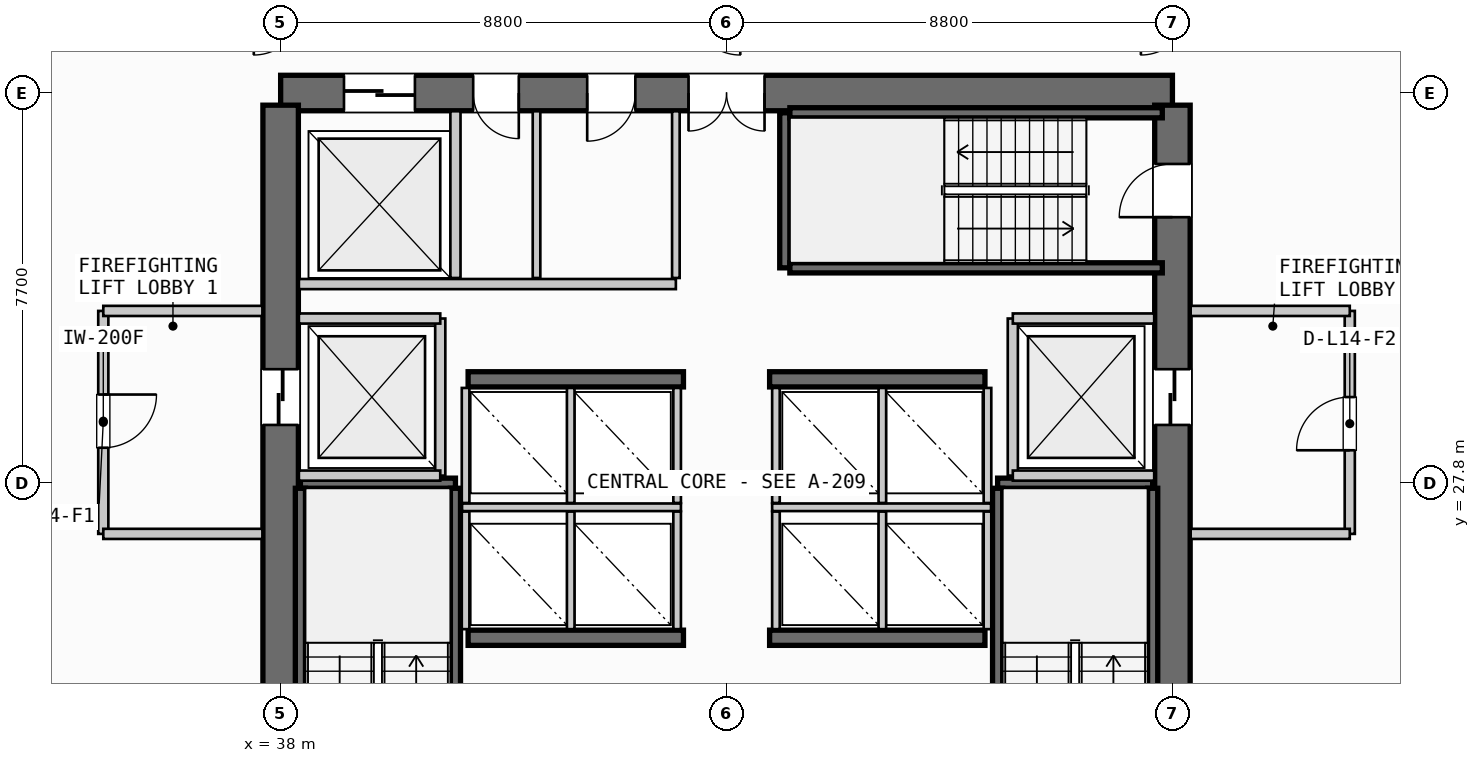
"""IFC4 building model, lengths in metres.
Left out: names, types, materials, properties, quantities, classifications, styles, units other than length and angle.
Written with IfcOpenShell. Run it as: python <this file> out.ifc"""

import sys

from ifc_helpers import new_model, si_unit, direction, frame, frame_2d, origin, place, context, subcontext, project, spatial, rectangle, extrude, source, transform, mapped, element, fill, save


model = new_model("IFC4")
c1 = context("Model", 3, precision=1e-05, world=origin(), true_north=direction((0.0, 1.0)))
c2 = subcontext(c1, "Body", "Model", "MODEL_VIEW")
j1 = project(units=[si_unit("LENGTHUNIT", "METRE"), si_unit("PLANEANGLEUNIT", "RADIAN")], contexts=[c1])
p1 = place(None, origin())
s1 = spatial("IfcSite", under=j1, at=p1, CompositionType="ELEMENT")
p2 = place(p1, origin())
s2 = spatial("IfcBuilding", under=s1, at=p2, CompositionType="ELEMENT")
p3 = place(p2, frame((0.0, 0.0, 60.0)))
s3 = spatial("IfcBuildingStorey", under=s2, at=p3, CompositionType="ELEMENT", Elevation=60.0)
p4 = place(p3, frame((55.6, 35.5, 0.0), z_axis=(0.0, 0.0, 1.0), x_axis=(-1.0, 0.0, 0.0)))
e1 = element("IfcWall", 1, at=p4, inside=s3, PredefinedType="SHEAR", context=c2, shape_type="SweptSolid", body=[
    extrude(rectangle(XDim=17.6, YDim=0.7, at=frame_2d((8.8, 0.0))), origin(), (0.0, 0.0, 1.0), 3.55),
])
p5 = place(p4, frame((8.05, 0.0, 0.0)))
e2 = element("IfcOpeningElement", 2, at=p5, cuts=e1, PredefinedType="OPENING", context=c2, shape_type="SweptSolid", body=[
    extrude(rectangle(XDim=1.5, YDim=2.2, at=frame_2d((0.75, 1.1))), frame((0.0, 0.36, 0.0), z_axis=(0.0, -1.0, 0.0), x_axis=(1.0, 0.0, 0.0)), (0.0, 0.0, 1.0), 0.72),
])
p6 = place(p4, frame((14.95, 0.0, 0.0)))
e3 = element("IfcOpeningElement", 3, at=p6, cuts=e1, PredefinedType="OPENING", context=c2, shape_type="SweptSolid", body=[
    extrude(rectangle(XDim=1.4, YDim=2.3, at=frame_2d((0.7, 1.15))), frame((0.0, 0.36, 0.0), z_axis=(0.0, -1.0, 0.0), x_axis=(1.0, 0.0, 0.0)), (0.0, 0.0, 1.0), 0.72),
])
p7 = place(p4, frame((12.9, 0.0, 0.0)))
e4 = element("IfcOpeningElement", 4, at=p7, cuts=e1, PredefinedType="OPENING", context=c2, shape_type="SweptSolid", body=[
    extrude(rectangle(XDim=0.9, YDim=2.15, at=frame_2d((0.45, 1.075))), frame((0.0, 0.36, 0.0), z_axis=(0.0, -1.0, 0.0), x_axis=(1.0, 0.0, 0.0)), (0.0, 0.0, 1.0), 0.72),
])
p8 = place(p4, frame((10.6, 0.0, 0.0)))
e5 = element("IfcOpeningElement", 5, at=p8, cuts=e1, PredefinedType="OPENING", context=c2, shape_type="SweptSolid", body=[
    extrude(rectangle(XDim=0.95, YDim=2.15, at=frame_2d((0.475, 1.075))), frame((0.0, 0.36, 0.0), z_axis=(0.0, -1.0, 0.0), x_axis=(1.0, 0.0, 0.0)), (0.0, 0.0, 1.0), 0.72),
])
p9 = place(p3, frame((38.0, 35.26, 0.0), z_axis=(0.0, 0.0, 1.0), x_axis=(0.0, -1.0, 0.0)))
e6 = element("IfcWall", 6, at=p9, inside=s3, PredefinedType="SHEAR", context=c2, shape_type="SweptSolid", body=[
    extrude(rectangle(XDim=14.92, YDim=0.7, at=frame_2d((7.46, 0.0))), origin(), (0.0, 0.0, 1.0), 3.55),
])
p10 = place(p9, frame((5.21, 0.0, 0.0)))
e7 = element("IfcOpeningElement", 7, at=p10, cuts=e6, PredefinedType="OPENING", context=c2, shape_type="SweptSolid", body=[
    extrude(rectangle(XDim=1.1, YDim=2.2, at=frame_2d((0.55, 1.1))), frame((0.0, 0.36, 0.0), z_axis=(0.0, -1.0, 0.0), x_axis=(1.0, 0.0, 0.0)), (0.0, 0.0, 1.0), 0.72),
])
p11 = place(p3, frame((55.6, 20.34, 0.0), z_axis=(0.0, 0.0, 1.0), x_axis=(0.0, 1.0, 0.0)))
e8 = element("IfcWall", 8, at=p11, inside=s3, PredefinedType="SHEAR", context=c2, shape_type="SweptSolid", body=[
    extrude(rectangle(XDim=14.92, YDim=0.7, at=frame_2d((7.46, 0.0))), origin(), (0.0, 0.0, 1.0), 3.55),
])
p12 = place(p11, frame((12.71, 0.0, 0.0)))
e9 = element("IfcOpeningElement", 9, at=p12, cuts=e8, PredefinedType="OPENING", context=c2, shape_type="SweptSolid", body=[
    extrude(rectangle(XDim=1.05, YDim=2.15, at=frame_2d((0.525, 1.075))), frame((0.0, 0.36, 0.0), z_axis=(0.0, -1.0, 0.0), x_axis=(1.0, 0.0, 0.0)), (0.0, 0.0, 1.0), 0.72),
])
p13 = place(p11, frame((8.61, 0.0, 0.0)))
e10 = element("IfcOpeningElement", 10, at=p13, cuts=e8, PredefinedType="OPENING", context=c2, shape_type="SweptSolid", body=[
    extrude(rectangle(XDim=1.1, YDim=2.2, at=frame_2d((0.55, 1.1))), frame((0.0, 0.36, 0.0), z_axis=(0.0, -1.0, 0.0), x_axis=(1.0, 0.0, 0.0)), (0.0, 0.0, 1.0), 0.72),
])
for number, where, z_axis, x_axis in (
    (11, (41.7, 24.75, 0.0), (0.0, 0.0, 1.0), (1.0, 0.0, 0.0)),
    (12, (47.65, 24.75, 0.0), (0.0, 0.0, 1.0), (1.0, 0.0, 0.0)),
    (13, (41.7, 29.85, 0.0), (0.0, 0.0, 1.0), (1.0, 0.0, 0.0)),
    (14, (47.65, 29.85, 0.0), (0.0, 0.0, 1.0), (1.0, 0.0, 0.0)),
):
    element("IfcWall", number, at=place(p3, frame(where, z_axis=z_axis, x_axis=x_axis)), inside=s3, PredefinedType="SHEAR", context=c2, shape_type="SweptSolid", body=[
        extrude(rectangle(XDim=4.25, YDim=0.3, at=frame_2d((2.125, 0.0))), origin(), (0.0, 0.0, 1.0), 3.55),
    ])
p14 = place(p3, frame((38.39, 27.8, 0.0), z_axis=(0.0, 0.0, 1.0), x_axis=(1.0, 0.0, 0.0)))
e15 = element("IfcWall", 15, at=p14, inside=s3, PredefinedType="SHEAR", context=c2, shape_type="SweptSolid", body=[
    extrude(rectangle(XDim=3.06, YDim=0.2, at=frame_2d((1.53, 0.0))), origin(), (0.0, 0.0, 1.0), 3.55),
])
for number, where, z_axis, x_axis in (
    (16, (41.45, 27.7, 0.0), (0.0, 0.0, 1.0), (0.0, -1.0, 0.0)),
    (17, (38.39, 20.35, 0.0), (0.0, 0.0, 1.0), (0.0, 1.0, 0.0)),
):
    element("IfcWall", number, at=place(p3, frame(where, z_axis=z_axis, x_axis=x_axis)), inside=s3, PredefinedType="SHEAR", context=c2, shape_type="SweptSolid", body=[
        extrude(rectangle(XDim=7.35, YDim=0.2, at=frame_2d((3.675, 0.0))), origin(), (0.0, 0.0, 1.0), 3.55),
    ])
p15 = place(p3, frame((52.15, 27.8, 0.0), z_axis=(0.0, 0.0, 1.0), x_axis=(1.0, 0.0, 0.0)))
e18 = element("IfcWall", 18, at=p15, inside=s3, PredefinedType="SHEAR", context=c2, shape_type="SweptSolid", body=[
    extrude(rectangle(XDim=3.06, YDim=0.2, at=frame_2d((1.53, 0.0))), origin(), (0.0, 0.0, 1.0), 3.55),
])
for number, where, z_axis, x_axis in (
    (19, (55.21, 27.7, 0.0), (0.0, 0.0, 1.0), (0.0, -1.0, 0.0)),
    (20, (52.15, 20.35, 0.0), (0.0, 0.0, 1.0), (0.0, 1.0, 0.0)),
):
    element("IfcWall", number, at=place(p3, frame(where, z_axis=z_axis, x_axis=x_axis)), inside=s3, PredefinedType="SHEAR", context=c2, shape_type="SweptSolid", body=[
        extrude(rectangle(XDim=7.35, YDim=0.2, at=frame_2d((3.675, 0.0))), origin(), (0.0, 0.0, 1.0), 3.55),
    ])
p16 = place(p3, frame((47.95, 32.05, 0.0), z_axis=(0.0, 0.0, 1.0), x_axis=(0.0, 1.0, 0.0)))
e21 = element("IfcWall", 21, at=p16, inside=s3, PredefinedType="SHEAR", context=c2, shape_type="SweptSolid", body=[
    extrude(rectangle(XDim=3.06, YDim=0.2, at=frame_2d((1.53, 0.0))), origin(), (0.0, 0.0, 1.0), 3.55),
])
for number, where, z_axis, x_axis in (
    (22, (48.05, 35.11, 0.0), (0.0, 0.0, 1.0), (1.0, 0.0, 0.0)),
    (23, (55.4, 32.05, 0.0), (0.0, 0.0, 1.0), (-1.0, 0.0, 0.0)),
):
    element("IfcWall", number, at=place(p3, frame(where, z_axis=z_axis, x_axis=x_axis)), inside=s3, PredefinedType="SHEAR", context=c2, shape_type="SweptSolid", body=[
        extrude(rectangle(XDim=7.35, YDim=0.2, at=frame_2d((3.675, 0.0))), origin(), (0.0, 0.0, 1.0), 3.55),
    ])
p17 = place(p3, frame((41.15, 27.95, 0.0), z_axis=(0.0, 0.0, 1.0), x_axis=(0.0, 1.0, 0.0)))
e24 = element("IfcWall", 24, at=p17, inside=s3, PredefinedType="PARTITIONING", context=c2, shape_type="SweptSolid", body=[
    extrude(rectangle(XDim=3.1, YDim=0.2, at=frame_2d((1.55, 0.0))), origin(), (0.0, 0.0, 1.0), 2.645),
])
for number, where, z_axis, x_axis in (
    (25, (38.36, 27.95, 0.0), (0.0, 0.0, 1.0), (1.0, 0.0, 0.0)),
    (26, (38.36, 31.05, 0.0), (0.0, 0.0, 1.0), (1.0, 0.0, 0.0)),
):
    element("IfcWall", number, at=place(p3, frame(where, z_axis=z_axis, x_axis=x_axis)), inside=s3, PredefinedType="PARTITIONING", context=c2, shape_type="SweptSolid", body=[
        extrude(rectangle(XDim=2.79, YDim=0.2, at=frame_2d((1.395, 0.0))), origin(), (0.0, 0.0, 1.0), 2.645),
    ])
p18 = place(p3, frame((34.5, 31.2, 0.0), z_axis=(0.0, 0.0, 1.0), x_axis=(0.0, -1.0, 0.0)))
e27 = element("IfcWall", 27, at=p18, inside=s3, PredefinedType="PARTITIONING", context=c2, shape_type="SweptSolid", body=[
    extrude(rectangle(XDim=4.4, YDim=0.2, at=frame_2d((2.2, 0.0))), origin(), (0.0, 0.0, 1.0), 2.645),
])
p19 = place(p18, frame((1.65, 0.0, 0.0)))
e28 = element("IfcOpeningElement", 28, at=p19, cuts=e27, PredefinedType="OPENING", context=c2, shape_type="SweptSolid", body=[
    extrude(rectangle(XDim=1.05, YDim=2.15, at=frame_2d((0.525, 1.075))), frame((0.0, 0.11, 0.0), z_axis=(0.0, -1.0, 0.0), x_axis=(1.0, 0.0, 0.0)), (0.0, 0.0, 1.0), 0.22),
])
for number, where, z_axis, x_axis in (
    (29, (34.5, 26.8, 0.0), (0.0, 0.0, 1.0), (1.0, 0.0, 0.0)),
    (30, (34.5, 31.2, 0.0), (0.0, 0.0, 1.0), (1.0, 0.0, 0.0)),
):
    element("IfcWall", number, at=place(p3, frame(where, z_axis=z_axis, x_axis=x_axis)), inside=s3, PredefinedType="PARTITIONING", context=c2, shape_type="SweptSolid", body=[
        extrude(rectangle(XDim=3.14, YDim=0.2, at=frame_2d((1.57, 0.0))), origin(), (0.0, 0.0, 1.0), 2.645),
    ])
p20 = place(p3, frame((52.45, 27.95, 0.0), z_axis=(0.0, 0.0, 1.0), x_axis=(0.0, 1.0, 0.0)))
e31 = element("IfcWall", 31, at=p20, inside=s3, PredefinedType="PARTITIONING", context=c2, shape_type="SweptSolid", body=[
    extrude(rectangle(XDim=3.1, YDim=0.2, at=frame_2d((1.55, 0.0))), origin(), (0.0, 0.0, 1.0), 2.645),
])
for number, where, z_axis, x_axis in (
    (32, (52.45, 27.95, 0.0), (0.0, 0.0, 1.0), (1.0, 0.0, 0.0)),
    (33, (52.45, 31.05, 0.0), (0.0, 0.0, 1.0), (1.0, 0.0, 0.0)),
):
    element("IfcWall", number, at=place(p3, frame(where, z_axis=z_axis, x_axis=x_axis)), inside=s3, PredefinedType="PARTITIONING", context=c2, shape_type="SweptSolid", body=[
        extrude(rectangle(XDim=2.79, YDim=0.2, at=frame_2d((1.395, 0.0))), origin(), (0.0, 0.0, 1.0), 2.645),
    ])
p21 = place(p3, frame((59.1, 26.8, 0.0), z_axis=(0.0, 0.0, 1.0), x_axis=(0.0, 1.0, 0.0)))
e34 = element("IfcWall", 34, at=p21, inside=s3, PredefinedType="PARTITIONING", context=c2, shape_type="SweptSolid", body=[
    extrude(rectangle(XDim=4.4, YDim=0.2, at=frame_2d((2.2, 0.0))), origin(), (0.0, 0.0, 1.0), 2.645),
])
p22 = place(p21, frame((1.65, 0.0, 0.0)))
e35 = element("IfcOpeningElement", 35, at=p22, cuts=e34, PredefinedType="OPENING", context=c2, shape_type="SweptSolid", body=[
    extrude(rectangle(XDim=1.05, YDim=2.15, at=frame_2d((0.525, 1.075))), frame((0.0, 0.11, 0.0), z_axis=(0.0, -1.0, 0.0), x_axis=(1.0, 0.0, 0.0)), (0.0, 0.0, 1.0), 0.22),
])
for number, where, z_axis, x_axis in (
    (36, (55.96, 26.8, 0.0), (0.0, 0.0, 1.0), (1.0, 0.0, 0.0)),
    (37, (55.96, 31.2, 0.0), (0.0, 0.0, 1.0), (1.0, 0.0, 0.0)),
):
    element("IfcWall", number, at=place(p3, frame(where, z_axis=z_axis, x_axis=x_axis)), inside=s3, PredefinedType="PARTITIONING", context=c2, shape_type="SweptSolid", body=[
        extrude(rectangle(XDim=3.14, YDim=0.2, at=frame_2d((1.57, 0.0))), origin(), (0.0, 0.0, 1.0), 2.645),
    ])
p23 = place(p3, frame((41.58, 27.325, 0.0), z_axis=(0.0, 0.0, 1.0), x_axis=(1.0, 0.0, 0.0)))
e38 = element("IfcWall", 38, at=p23, inside=s3, PredefinedType="PARTITIONING", context=c2, shape_type="SweptSolid", body=[
    extrude(rectangle(XDim=4.32, YDim=0.15, at=frame_2d((2.16, 0.0))), origin(), (0.0, 0.0, 1.0), 2.645),
])
p24 = place(p3, frame((47.7, 27.325, 0.0), z_axis=(0.0, 0.0, 1.0), x_axis=(1.0, 0.0, 0.0)))
e39 = element("IfcWall", 39, at=p24, inside=s3, PredefinedType="PARTITIONING", context=c2, shape_type="SweptSolid", body=[
    extrude(rectangle(XDim=4.32, YDim=0.15, at=frame_2d((2.16, 0.0))), origin(), (0.0, 0.0, 1.0), 2.645),
])
for number, where, z_axis, x_axis in (
    (40, (41.65, 24.92, 0.0), (0.0, 0.0, 1.0), (0.0, 1.0, 0.0)),
    (41, (43.725, 24.92, 0.0), (0.0, 0.0, 1.0), (0.0, 1.0, 0.0)),
    (42, (45.825, 24.92, 0.0), (0.0, 0.0, 1.0), (0.0, 1.0, 0.0)),
    (43, (47.775, 24.92, 0.0), (0.0, 0.0, 1.0), (0.0, 1.0, 0.0)),
    (44, (49.875, 24.92, 0.0), (0.0, 0.0, 1.0), (0.0, 1.0, 0.0)),
    (45, (51.95, 24.92, 0.0), (0.0, 0.0, 1.0), (0.0, 1.0, 0.0)),
):
    element("IfcWall", number, at=place(p3, frame(where, z_axis=z_axis, x_axis=x_axis)), inside=s3, PredefinedType="PARTITIONING", context=c2, shape_type="SweptSolid", body=[
        extrude(rectangle(XDim=2.32, YDim=0.15, at=frame_2d((1.16, 0.0))), origin(), (0.0, 0.0, 1.0), 2.645),
    ])
for number, where, z_axis, x_axis in (
    (46, (41.65, 27.41, 0.0), (0.0, 0.0, 1.0), (0.0, 1.0, 0.0)),
    (47, (43.725, 27.41, 0.0), (0.0, 0.0, 1.0), (0.0, 1.0, 0.0)),
    (48, (45.825, 27.41, 0.0), (0.0, 0.0, 1.0), (0.0, 1.0, 0.0)),
    (49, (47.775, 27.41, 0.0), (0.0, 0.0, 1.0), (0.0, 1.0, 0.0)),
    (50, (49.875, 27.41, 0.0), (0.0, 0.0, 1.0), (0.0, 1.0, 0.0)),
    (51, (51.95, 27.41, 0.0), (0.0, 0.0, 1.0), (0.0, 1.0, 0.0)),
):
    element("IfcWall", number, at=place(p3, frame(where, z_axis=z_axis, x_axis=x_axis)), inside=s3, PredefinedType="PARTITIONING", context=c2, shape_type="SweptSolid", body=[
        extrude(rectangle(XDim=2.27, YDim=0.15, at=frame_2d((1.135, 0.0))), origin(), (0.0, 0.0, 1.0), 2.645),
    ])
p25 = place(p3, frame((41.45, 31.85, 0.0), z_axis=(0.0, 0.0, 1.0), x_axis=(0.0, 1.0, 0.0)))
e52 = element("IfcWall", 52, at=p25, inside=s3, PredefinedType="PARTITIONING", context=c2, shape_type="SweptSolid", body=[
    extrude(rectangle(XDim=3.29, YDim=0.2, at=frame_2d((1.645, 0.0))), origin(), (0.0, 0.0, 1.0), 2.645),
])
p26 = place(p3, frame((38.36, 31.73, 0.0), z_axis=(0.0, 0.0, 1.0), x_axis=(1.0, 0.0, 0.0)))
e53 = element("IfcWall", 53, at=p26, inside=s3, PredefinedType="PARTITIONING", context=c2, shape_type="SweptSolid", body=[
    extrude(rectangle(XDim=7.44, YDim=0.2, at=frame_2d((3.72, 0.0))), origin(), (0.0, 0.0, 1.0), 2.645),
])
p27 = place(p3, frame((45.8, 31.85, 0.0), z_axis=(0.0, 0.0, 1.0), x_axis=(0.0, 1.0, 0.0)))
e54 = element("IfcWall", 54, at=p27, inside=s3, PredefinedType="PARTITIONING", context=c2, shape_type="SweptSolid", body=[
    extrude(rectangle(XDim=3.29, YDim=0.15, at=frame_2d((1.645, 0.0))), origin(), (0.0, 0.0, 1.0), 2.645),
])
p28 = place(p3, frame((43.05, 31.85, 0.0), z_axis=(0.0, 0.0, 1.0), x_axis=(0.0, 1.0, 0.0)))
e55 = element("IfcWall", 55, at=p28, inside=s3, PredefinedType="PLUMBINGWALL", context=c2, shape_type="SweptSolid", body=[
    extrude(rectangle(XDim=3.29, YDim=0.15, at=frame_2d((1.645, 0.0))), origin(), (0.0, 0.0, 1.0), 2.645),
])
m1 = source(origin(), c2, "Body", "SweptSolid", [
    extrude(rectangle(XDim=1.05, YDim=2.15, at=frame_2d((0.525, 1.075))), frame((0.0, 0.025, 0.0), z_axis=(0.0, -1.0, 0.0), x_axis=(1.0, 0.0, 0.0)), (0.0, 0.0, 1.0), 0.05),
])
p29 = place(p12, origin())
e56 = element("IfcDoor", 56, at=p29, inside=s3, OperationType="SINGLE_SWING_LEFT", PredefinedType="DOOR", context=c2, shape_type="MappedRepresentation", body=[
    mapped(m1, transform((0.0, 0.0, 0.0), scale=1.0)),
])
fill(e9, e56)
m2 = source(origin(), c2, "Body", "SweptSolid", [
    extrude(rectangle(XDim=1.5, YDim=2.2, at=frame_2d((0.75, 1.1))), frame((0.0, 0.025, 0.0), z_axis=(0.0, -1.0, 0.0), x_axis=(1.0, 0.0, 0.0)), (0.0, 0.0, 1.0), 0.05),
])
p30 = place(p5, origin())
e57 = element("IfcDoor", 57, at=p30, inside=s3, OperationType="DOUBLE_DOOR_SINGLE_SWING", PredefinedType="DOOR", context=c2, shape_type="MappedRepresentation", body=[
    mapped(m2, transform((0.0, 0.0, 0.0), scale=1.0)),
])
fill(e2, e57)
m3 = source(origin(), c2, "Body", "SweptSolid", [
    extrude(rectangle(XDim=1.1, YDim=2.2, at=frame_2d((0.55, 1.1))), frame((0.0, 0.025, 0.0), z_axis=(0.0, -1.0, 0.0), x_axis=(1.0, 0.0, 0.0)), (0.0, 0.0, 1.0), 0.05),
])
p31 = place(p10, origin())
e58 = element("IfcDoor", 58, at=p31, inside=s3, OperationType="SLIDING_TO_LEFT", PredefinedType="DOOR", context=c2, shape_type="MappedRepresentation", body=[
    mapped(m3, transform((0.0, 0.0, 0.0), scale=1.0)),
])
fill(e7, e58)
p32 = place(p13, origin())
e59 = element("IfcDoor", 59, at=p32, inside=s3, OperationType="SLIDING_TO_RIGHT", PredefinedType="DOOR", context=c2, shape_type="MappedRepresentation", body=[
    mapped(m3, transform((0.0, 0.0, 0.0), scale=1.0)),
])
fill(e10, e59)
m4 = source(origin(), c2, "Body", "SweptSolid", [
    extrude(rectangle(XDim=1.4, YDim=2.3, at=frame_2d((0.7, 1.15))), frame((0.0, 0.025, 0.0), z_axis=(0.0, -1.0, 0.0), x_axis=(1.0, 0.0, 0.0)), (0.0, 0.0, 1.0), 0.05),
])
p33 = place(p6, origin())
e60 = element("IfcDoor", 60, at=p33, inside=s3, OperationType="SLIDING_TO_RIGHT", PredefinedType="DOOR", context=c2, shape_type="MappedRepresentation", body=[
    mapped(m4, transform((0.0, 0.0, 0.0), scale=1.0)),
])
fill(e3, e60)
m5 = source(origin(), c2, "Body", "SweptSolid", [
    extrude(rectangle(XDim=0.9, YDim=2.15, at=frame_2d((0.45, 1.075))), frame((0.0, 0.025, 0.0), z_axis=(0.0, -1.0, 0.0), x_axis=(1.0, 0.0, 0.0)), (0.0, 0.0, 1.0), 0.05),
])
p34 = place(p7, origin())
e61 = element("IfcDoor", 61, at=p34, inside=s3, OperationType="SINGLE_SWING_LEFT", PredefinedType="DOOR", context=c2, shape_type="MappedRepresentation", body=[
    mapped(m5, transform((0.0, 0.0, 0.0), scale=1.0)),
])
fill(e4, e61)
m6 = source(origin(), c2, "Body", "SweptSolid", [
    extrude(rectangle(XDim=0.95, YDim=2.15, at=frame_2d((0.475, 1.075))), frame((0.0, 0.025, 0.0), z_axis=(0.0, -1.0, 0.0), x_axis=(1.0, 0.0, 0.0)), (0.0, 0.0, 1.0), 0.05),
])
p35 = place(p8, origin())
e62 = element("IfcDoor", 62, at=p35, inside=s3, OperationType="SINGLE_SWING_RIGHT", PredefinedType="DOOR", context=c2, shape_type="MappedRepresentation", body=[
    mapped(m6, transform((0.0, 0.0, 0.0), scale=1.0)),
])
fill(e5, e62)
p36 = place(p19, origin())
e63 = element("IfcDoor", 63, at=p36, inside=s3, OperationType="SINGLE_SWING_LEFT", PredefinedType="DOOR", context=c2, shape_type="MappedRepresentation", body=[
    mapped(m1, transform((0.0, 0.0, 0.0), scale=1.0)),
])
fill(e28, e63)
p37 = place(p22, origin())
e64 = element("IfcDoor", 64, at=p37, inside=s3, OperationType="SINGLE_SWING_LEFT", PredefinedType="DOOR", context=c2, shape_type="MappedRepresentation", body=[
    mapped(m1, transform((0.0, 0.0, 0.0), scale=1.0)),
])
fill(e35, e64)
save(model, sys.argv[1])
